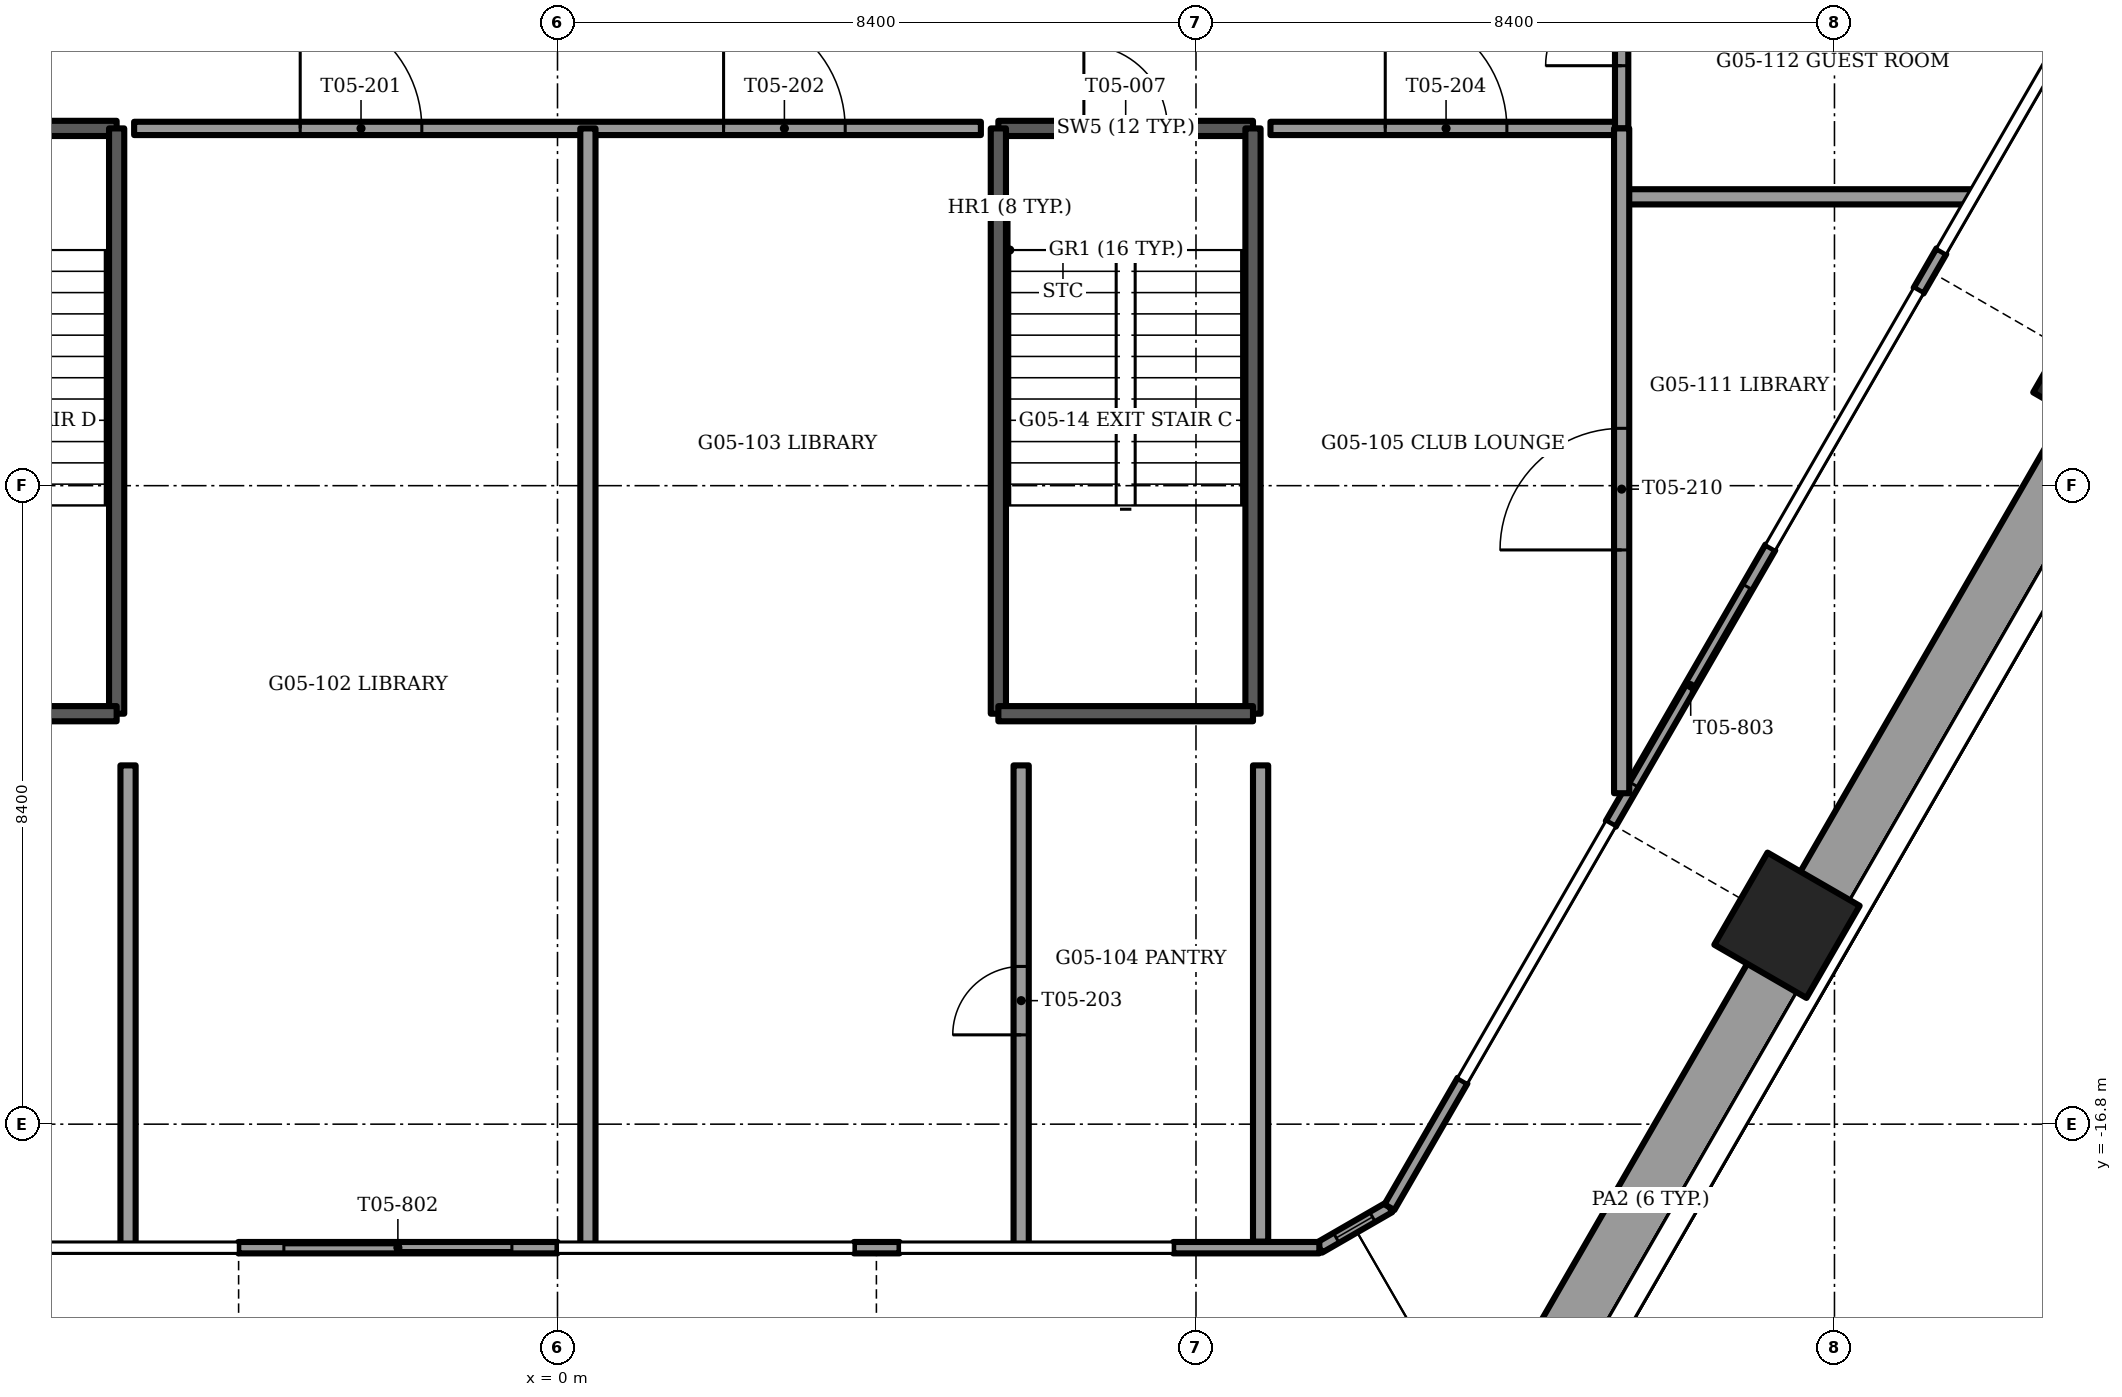
"""IFC4 building model, lengths in metres.
Left out: names, types, materials, properties, quantities, classifications, styles, units other than length and angle.
Written with IfcOpenShell. Run it as: python <this file> out.ifc"""

import sys

from ifc_helpers import new_model, si_unit, direction, frame, frame_2d, origin, origin_2d, place, context, subcontext, project, spatial, rectangle, extrude, element, fill, save


model = new_model("IFC4")
c1 = context("Model", 3, precision=1e-05, world=origin(), true_north=direction((0.0, 1.0)))
c2 = subcontext(c1, "Body", "Model", "MODEL_VIEW")
j1 = project(units=[si_unit("LENGTHUNIT", "METRE"), si_unit("PLANEANGLEUNIT", "RADIAN")], contexts=[c1])
p1 = place(None, origin())
s1 = spatial("IfcSite", under=j1, at=p1, CompositionType="ELEMENT")
p2 = place(p1, origin())
s2 = spatial("IfcBuilding", under=s1, at=p2, CompositionType="ELEMENT")
p3 = place(p2, frame((0.0, 0.0, 23.5)))
s3 = spatial("IfcBuildingStorey", under=s2, at=p3, CompositionType="ELEMENT", Elevation=23.5)
for number, where, z_axis, x_axis in (
    (1, (16.175, -14.183, -1.2), (0.0, 0.0, 1.0), (-0.5, -0.866, 0.0)),
    (2, (20.371, -6.917, -1.2), (0.0, 0.0, 1.0), (-0.5, -0.866, 0.0)),
):
    element("IfcColumn", number, at=place(p3, frame(where, z_axis=z_axis, x_axis=x_axis)), inside=s3, PredefinedType="COLUMN", context=c2, shape_type="SweptSolid", body=[
        extrude(rectangle(XDim=1.4, YDim=1.4, at=origin_2d()), origin(), (0.0, 0.0, 1.0), 4.5),
    ])
p4 = place(p3, frame((12.705, -20.694, 0.0), z_axis=(0.0, 0.0, 1.0), x_axis=(0.500005133765, 0.866022439784, 0.0)))
e3 = element("IfcWall", 3, at=p4, inside=s3, PredefinedType="PARAPET", context=c2, shape_type="SweptSolid", body=[
    extrude(rectangle(XDim=6.704, YDim=0.9, at=frame_2d((3.352, 0.0))), origin(), (0.0, 0.0, 1.0), 1.1),
])
p5 = place(p3, frame((16.727, -13.728, 0.0), z_axis=(0.0, 0.0, 1.0), x_axis=(0.499997206141, 0.866027016814, 0.0)))
e4 = element("IfcWall", 4, at=p5, inside=s3, PredefinedType="PARAPET", context=c2, shape_type="SweptSolid", body=[
    extrude(rectangle(XDim=7.051, YDim=0.9, at=frame_2d((3.525, 0.0))), origin(), (0.0, 0.0, 1.0), 1.1),
])
p6 = place(p3, frame((-4.2, -18.425, 0.0), z_axis=(0.0, 0.0, 1.0), x_axis=(1.0, 0.0, 0.0)))
e5 = element("IfcWall", 5, at=p6, inside=s3, PredefinedType="SOLIDWALL", context=c2, shape_type="SweptSolid", body=[
    extrude(rectangle(XDim=4.2, YDim=0.15, at=frame_2d((2.1, 0.0))), origin(), (0.0, 0.0, 1.0), 4.2),
])
p7 = place(p6, frame((0.6, 0.0, 0.0)))
e6 = element("IfcOpeningElement", 6, at=p7, cuts=e5, PredefinedType="OPENING", context=c2, shape_type="SweptSolid", body=[
    extrude(rectangle(XDim=3.0, YDim=2.4, at=frame_2d((1.5, 1.2))), frame((0.0, 0.075, 0.0), z_axis=(0.0, -1.0, 0.0), x_axis=(1.0, 0.0, 0.0)), (0.0, 0.0, 1.0), 0.15),
])
p8 = place(p3, frame((8.1, -18.425, 0.0), z_axis=(0.0, 0.0, 1.0), x_axis=(1.0, 0.0, 0.0)))
e7 = element("IfcWall", 7, at=p8, inside=s3, PredefinedType="SOLIDWALL", context=c2, shape_type="SweptSolid", body=[
    extrude(rectangle(XDim=1.923, YDim=0.15, at=frame_2d((0.961, 0.0))), origin(), (0.0, 0.0, 1.0), 4.2),
])
p9 = place(p3, frame((3.9, -18.425, 0.0), z_axis=(0.0, 0.0, 1.0), x_axis=(1.0, 0.0, 0.0)))
e8 = element("IfcWall", 8, at=p9, inside=s3, PredefinedType="SOLIDWALL", context=c2, shape_type="SweptSolid", body=[
    extrude(rectangle(XDim=0.6, YDim=0.15, at=frame_2d((0.3, 0.0))), origin(), (0.0, 0.0, 1.0), 4.2),
])
p10 = place(p3, frame((13.856, -12.85, 0.0), z_axis=(0.0, 0.0, 1.0), x_axis=(0.500002543286, 0.866023935413, 0.0)))
e9 = element("IfcWall", 9, at=p10, inside=s3, PredefinedType="SOLIDWALL", context=c2, shape_type="SweptSolid", body=[
    extrude(rectangle(XDim=4.2, YDim=0.15, at=frame_2d((2.1, 0.0))), origin(), (0.0, 0.0, 1.0), 4.2),
])
p11 = place(p10, frame((0.6, 0.0, 0.0)))
e10 = element("IfcOpeningElement", 10, at=p11, cuts=e9, PredefinedType="OPENING", context=c2, shape_type="SweptSolid", body=[
    extrude(rectangle(XDim=3.0, YDim=2.4, at=frame_2d((1.5, 1.2))), frame((0.0, 0.075, 0.0), z_axis=(0.0, -1.0, 0.0), x_axis=(1.0, 0.0, 0.0)), (0.0, 0.0, 1.0), 0.15),
])
p12 = place(p3, frame((10.945, -17.893, 0.0), z_axis=(0.0, 0.0, 1.0), x_axis=(0.499989888488, 0.86603124159, 0.0)))
e11 = element("IfcWall", 11, at=p12, inside=s3, PredefinedType="SOLIDWALL", context=c2, shape_type="SweptSolid", body=[
    extrude(rectangle(XDim=1.923, YDim=0.15, at=frame_2d((0.961, 0.0))), origin(), (0.0, 0.0, 1.0), 4.2),
])
p13 = place(p3, frame((17.906, -5.835, 0.0), z_axis=(0.0, 0.0, 1.0), x_axis=(0.50012165622, 0.865955154139, 0.0)))
e12 = element("IfcWall", 12, at=p13, inside=s3, PredefinedType="SOLIDWALL", context=c2, shape_type="SweptSolid", body=[
    extrude(rectangle(XDim=0.6, YDim=0.15, at=frame_2d((0.3, 0.0))), origin(), (0.0, 0.0, 1.0), 4.2),
])
p14 = place(p3, frame((10.023, -18.425, 0.0), z_axis=(0.0, 0.0, 1.0), x_axis=(0.866048165231, 0.499960573946, 0.0)))
e13 = element("IfcWall", 13, at=p14, inside=s3, PredefinedType="SOLIDWALL", context=c2, shape_type="SweptSolid", body=[
    extrude(rectangle(XDim=1.065, YDim=0.15, at=frame_2d((0.532, 0.0))), origin(), (0.0, 0.0, 1.0), 4.2),
])
p15 = place(p14, frame((0.258, 0.0, 0.15)))
e14 = element("IfcOpeningElement", 14, at=p15, cuts=e13, PredefinedType="OPENING", context=c2, shape_type="SweptSolid", body=[
    extrude(rectangle(XDim=0.55, YDim=3.6, at=frame_2d((0.275, 1.8))), frame((0.0, 0.075, 0.0), z_axis=(0.0, -1.0, 0.0), x_axis=(1.0, 0.0, 0.0)), (0.0, 0.0, 1.0), 0.15),
])
p16 = place(p3, frame((5.8, -3.7, -0.3), z_axis=(0.0, 0.0, 1.0), x_axis=(1.0, 0.0, 0.0)))
e15 = element("IfcWall", 15, at=p16, inside=s3, PredefinedType="SOLIDWALL", context=c2, shape_type="SweptSolid", body=[
    extrude(rectangle(XDim=3.35, YDim=0.2, at=frame_2d((1.675, 0.0))), origin(), (0.0, 0.0, 1.0), 4.5),
])
p17 = place(p16, frame((1.125, 0.0, 0.0)))
e16 = element("IfcOpeningElement", 16, at=p17, cuts=e15, PredefinedType="OPENING", context=c2, shape_type="SweptSolid", body=[
    extrude(rectangle(XDim=1.1, YDim=2.1, at=frame_2d((0.55, 1.05))), frame((0.0, 0.1, 0.0), z_axis=(0.0, -1.0, 0.0), x_axis=(1.0, 0.0, 0.0)), (0.0, 0.0, 1.0), 0.2),
])
for number, where, z_axis, x_axis in (
    (17, (5.8, -3.7, -0.3), (0.0, 0.0, 1.0), (0.0, -1.0, 0.0)),
    (18, (9.15, -3.7, -0.3), (0.0, 0.0, 1.0), (0.0, -1.0, 0.0)),
):
    element("IfcWall", number, at=place(p3, frame(where, z_axis=z_axis, x_axis=x_axis)), inside=s3, PredefinedType="SOLIDWALL", context=c2, shape_type="SweptSolid", body=[
        extrude(rectangle(XDim=7.7, YDim=0.2, at=frame_2d((3.85, 0.0))), origin(), (0.0, 0.0, 1.0), 4.5),
    ])
p18 = place(p3, frame((5.8, -11.4, -0.3), z_axis=(0.0, 0.0, 1.0), x_axis=(1.0, 0.0, 0.0)))
e19 = element("IfcWall", 19, at=p18, inside=s3, PredefinedType="SOLIDWALL", context=c2, shape_type="SweptSolid", body=[
    extrude(rectangle(XDim=3.35, YDim=0.2, at=frame_2d((1.675, 0.0))), origin(), (0.0, 0.0, 1.0), 4.5),
])
p19 = place(p3, frame((-9.15, -3.7, -0.3), z_axis=(0.0, 0.0, 1.0), x_axis=(1.0, 0.0, 0.0)))
e20 = element("IfcWall", 20, at=p19, inside=s3, PredefinedType="SOLIDWALL", context=c2, shape_type="SweptSolid", body=[
    extrude(rectangle(XDim=3.35, YDim=0.2, at=frame_2d((1.675, 0.0))), origin(), (0.0, 0.0, 1.0), 4.5),
])
p20 = place(p19, frame((1.125, 0.0, 0.0)))
e21 = element("IfcOpeningElement", 21, at=p20, cuts=e20, PredefinedType="OPENING", context=c2, shape_type="SweptSolid", body=[
    extrude(rectangle(XDim=1.1, YDim=2.1, at=frame_2d((0.55, 1.05))), frame((0.0, 0.1, 0.0), z_axis=(0.0, -1.0, 0.0), x_axis=(1.0, 0.0, 0.0)), (0.0, 0.0, 1.0), 0.2),
])
p21 = place(p3, frame((-5.8, -3.7, -0.3), z_axis=(0.0, 0.0, 1.0), x_axis=(0.0, -1.0, 0.0)))
e22 = element("IfcWall", 22, at=p21, inside=s3, PredefinedType="SOLIDWALL", context=c2, shape_type="SweptSolid", body=[
    extrude(rectangle(XDim=7.7, YDim=0.2, at=frame_2d((3.85, 0.0))), origin(), (0.0, 0.0, 1.0), 4.5),
])
p22 = place(p3, frame((-9.15, -11.4, -0.3), z_axis=(0.0, 0.0, 1.0), x_axis=(1.0, 0.0, 0.0)))
e23 = element("IfcWall", 23, at=p22, inside=s3, PredefinedType="SOLIDWALL", context=c2, shape_type="SweptSolid", body=[
    extrude(rectangle(XDim=3.35, YDim=0.2, at=frame_2d((1.675, 0.0))), origin(), (0.0, 0.0, 1.0), 4.5),
])
p23 = place(p3, frame((-5.57, -3.7, 0.0), z_axis=(0.0, 0.0, 1.0), x_axis=(1.0, 0.0, 0.0)))
e24 = element("IfcWall", 24, at=p23, inside=s3, PredefinedType="PARTITIONING", context=c2, shape_type="SweptSolid", body=[
    extrude(rectangle(XDim=11.14, YDim=0.175, at=frame_2d((5.57, 0.0))), origin(), (0.0, 0.0, 1.0), 4.2),
])
p24 = place(p23, frame((2.185, 0.0, 0.0)))
e25 = element("IfcOpeningElement", 25, at=p24, cuts=e24, PredefinedType="OPENING", context=c2, shape_type="SweptSolid", body=[
    extrude(rectangle(XDim=1.6, YDim=2.1, at=frame_2d((0.8, 1.05))), frame((0.0, 0.087, 0.0), z_axis=(0.0, -1.0, 0.0), x_axis=(1.0, 0.0, 0.0)), (0.0, 0.0, 1.0), 0.175),
])
p25 = place(p23, frame((7.755, 0.0, 0.0)))
e26 = element("IfcOpeningElement", 26, at=p25, cuts=e24, PredefinedType="OPENING", context=c2, shape_type="SweptSolid", body=[
    extrude(rectangle(XDim=1.6, YDim=2.1, at=frame_2d((0.8, 1.05))), frame((0.0, 0.087, 0.0), z_axis=(0.0, -1.0, 0.0), x_axis=(1.0, 0.0, 0.0)), (0.0, 0.0, 1.0), 0.175),
])
p26 = place(p3, frame((9.38, -3.7, 0.0), z_axis=(0.0, 0.0, 1.0), x_axis=(1.0, 0.0, 0.0)))
e27 = element("IfcWall", 27, at=p26, inside=s3, PredefinedType="PARTITIONING", context=c2, shape_type="SweptSolid", body=[
    extrude(rectangle(XDim=4.62, YDim=0.175, at=frame_2d((2.31, 0.0))), origin(), (0.0, 0.0, 1.0), 4.2),
])
p27 = place(p26, frame((1.51, 0.0, 0.0)))
e28 = element("IfcOpeningElement", 28, at=p27, cuts=e27, PredefinedType="OPENING", context=c2, shape_type="SweptSolid", body=[
    extrude(rectangle(XDim=1.6, YDim=2.1, at=frame_2d((0.8, 1.05))), frame((0.0, 0.087, 0.0), z_axis=(0.0, -1.0, 0.0), x_axis=(1.0, 0.0, 0.0)), (0.0, 0.0, 1.0), 0.175),
])
p28 = place(p3, frame((14.0, -3.7, 0.0), z_axis=(0.0, 0.0, 1.0), x_axis=(0.0, 1.0, 0.0)))
e29 = element("IfcWall", 29, at=p28, inside=s3, PredefinedType="PARTITIONING", context=c2, shape_type="SweptSolid", body=[
    extrude(rectangle(XDim=16.268, YDim=0.175, at=frame_2d((8.134, 0.0))), origin(), (0.0, 0.0, 1.0), 4.2),
])
p29 = place(p28, frame((0.825, 0.0, 0.0)))
e30 = element("IfcOpeningElement", 30, at=p29, cuts=e29, PredefinedType="OPENING", context=c2, shape_type="SweptSolid", body=[
    extrude(rectangle(XDim=1.0, YDim=2.1, at=frame_2d((0.5, 1.05))), frame((0.0, 0.087, 0.0), z_axis=(0.0, -1.0, 0.0), x_axis=(1.0, 0.0, 0.0)), (0.0, 0.0, 1.0), 0.175),
])
p30 = place(p28, frame((6.125, 0.0, 0.0)))
e31 = element("IfcOpeningElement", 31, at=p30, cuts=e29, PredefinedType="OPENING", context=c2, shape_type="SweptSolid", body=[
    extrude(rectangle(XDim=1.0, YDim=2.1, at=frame_2d((0.5, 1.05))), frame((0.0, 0.087, 0.0), z_axis=(0.0, -1.0, 0.0), x_axis=(1.0, 0.0, 0.0)), (0.0, 0.0, 1.0), 0.175),
])
p31 = place(p28, frame((12.55, 0.0, 0.0)))
e32 = element("IfcOpeningElement", 32, at=p31, cuts=e29, PredefinedType="OPENING", context=c2, shape_type="SweptSolid", body=[
    extrude(rectangle(XDim=0.9, YDim=2.1, at=frame_2d((0.45, 1.05))), frame((0.0, 0.087, 0.0), z_axis=(0.0, -1.0, 0.0), x_axis=(1.0, 0.0, 0.0)), (0.0, 0.0, 1.0), 0.175),
])
p32 = place(p3, frame((14.0, -4.6, 0.0), z_axis=(0.0, 0.0, 1.0), x_axis=(1.0, 0.0, 0.0)))
e33 = element("IfcWall", 33, at=p32, inside=s3, PredefinedType="PARTITIONING", context=c2, shape_type="SweptSolid", body=[
    extrude(rectangle(XDim=4.598, YDim=0.2, at=frame_2d((2.299, 0.0))), origin(), (0.0, 0.0, 1.0), 4.2),
])
p33 = place(p3, frame((-5.65, -18.406, 0.0), z_axis=(0.0, 0.0, 1.0), x_axis=(0.0, 1.0, 0.0)))
e34 = element("IfcWall", 34, at=p33, inside=s3, PredefinedType="PARTITIONING", context=c2, shape_type="SweptSolid", body=[
    extrude(rectangle(XDim=6.326, YDim=0.2, at=frame_2d((3.163, 0.0))), origin(), (0.0, 0.0, 1.0), 4.2),
])
p34 = place(p3, frame((0.4, -18.406, 0.0), z_axis=(0.0, 0.0, 1.0), x_axis=(0.0, 1.0, 0.0)))
e35 = element("IfcWall", 35, at=p34, inside=s3, PredefinedType="PARTITIONING", context=c2, shape_type="SweptSolid", body=[
    extrude(rectangle(XDim=14.706, YDim=0.2, at=frame_2d((7.353, 0.0))), origin(), (0.0, 0.0, 1.0), 4.2),
])
p35 = place(p3, frame((6.1, -18.406, 0.0), z_axis=(0.0, 0.0, 1.0), x_axis=(0.0, 1.0, 0.0)))
e36 = element("IfcWall", 36, at=p35, inside=s3, PredefinedType="PARTITIONING", context=c2, shape_type="SweptSolid", body=[
    extrude(rectangle(XDim=6.326, YDim=0.2, at=frame_2d((3.163, 0.0))), origin(), (0.0, 0.0, 1.0), 4.2),
])
p36 = place(p35, frame((2.781, 0.0, 0.0)))
e37 = element("IfcOpeningElement", 37, at=p36, cuts=e36, PredefinedType="OPENING", context=c2, shape_type="SweptSolid", body=[
    extrude(rectangle(XDim=0.9, YDim=2.1, at=frame_2d((0.45, 1.05))), frame((0.0, 0.1, 0.0), z_axis=(0.0, -1.0, 0.0), x_axis=(1.0, 0.0, 0.0)), (0.0, 0.0, 1.0), 0.2),
])
p37 = place(p3, frame((9.25, -18.345, 0.0), z_axis=(0.0, 0.0, 1.0), x_axis=(0.0, 1.0, 0.0)))
e38 = element("IfcWall", 38, at=p37, inside=s3, PredefinedType="PARTITIONING", context=c2, shape_type="SweptSolid", body=[
    extrude(rectangle(XDim=6.265, YDim=0.2, at=frame_2d((3.132, 0.0))), origin(), (0.0, 0.0, 1.0), 4.2),
])
p38 = place(p3, frame((14.0, -12.446, 0.0), z_axis=(0.0, 0.0, 1.0), x_axis=(0.0, 1.0, 0.0)))
e39 = element("IfcWall", 39, at=p38, inside=s3, PredefinedType="PARTITIONING", context=c2, shape_type="SweptSolid", body=[
    extrude(rectangle(XDim=8.746, YDim=0.2, at=frame_2d((4.373, 0.0))), origin(), (0.0, 0.0, 1.0), 4.2),
])
p39 = place(p38, frame((3.201, 0.0, 0.0)))
e40 = element("IfcOpeningElement", 40, at=p39, cuts=e39, PredefinedType="OPENING", context=c2, shape_type="SweptSolid", body=[
    extrude(rectangle(XDim=1.6, YDim=2.1, at=frame_2d((0.8, 1.05))), frame((0.0, 0.1, 0.0), z_axis=(0.0, -1.0, 0.0), x_axis=(1.0, 0.0, 0.0)), (0.0, 0.0, 1.0), 0.2),
])
p40 = place(p7, origin())
e41 = element("IfcDoor", 41, at=p40, inside=s3, OperationType="SLIDING_TO_RIGHT", PredefinedType="DOOR", context=c2, shape_type="SweptSolid", body=[
    extrude(rectangle(XDim=3.0, YDim=2.4, at=frame_2d((1.5, 1.2))), frame((0.0, 0.025, 0.0), z_axis=(0.0, -1.0, 0.0), x_axis=(1.0, 0.0, 0.0)), (0.0, 0.0, 1.0), 0.05),
])
fill(e6, e41)
p41 = place(p11, origin())
e42 = element("IfcDoor", 42, at=p41, inside=s3, OperationType="SLIDING_TO_RIGHT", PredefinedType="DOOR", context=c2, shape_type="SweptSolid", body=[
    extrude(rectangle(XDim=3.0, YDim=2.4, at=frame_2d((1.5, 1.2))), frame((0.0, 0.025, 0.0), z_axis=(0.0, -1.0, 0.0), x_axis=(1.0, 0.0, 0.0)), (0.0, 0.0, 1.0), 0.05),
])
fill(e10, e42)
p42 = place(p15, origin())
e43 = element("IfcWindow", 43, at=p42, inside=s3, PartitioningType="SINGLE_PANEL", PredefinedType="WINDOW", context=c2, shape_type="SweptSolid", body=[
    extrude(rectangle(XDim=0.55, YDim=3.6, at=frame_2d((0.275, 1.8))), frame((0.0, 0.03, 0.0), z_axis=(0.0, -1.0, 0.0), x_axis=(1.0, 0.0, 0.0)), (0.0, 0.0, 1.0), 0.06),
])
fill(e14, e43)
p43 = place(p17, origin())
e44 = element("IfcDoor", 44, at=p43, inside=s3, OperationType="SINGLE_SWING_LEFT", PredefinedType="DOOR", context=c2, shape_type="SweptSolid", body=[
    extrude(rectangle(XDim=1.1, YDim=2.1, at=frame_2d((0.55, 1.05))), frame((0.0, 0.025, 0.0), z_axis=(0.0, -1.0, 0.0), x_axis=(1.0, 0.0, 0.0)), (0.0, 0.0, 1.0), 0.05),
])
fill(e16, e44)
p44 = place(p24, origin())
e45 = element("IfcDoor", 45, at=p44, inside=s3, OperationType="DOUBLE_DOOR_SINGLE_SWING", PredefinedType="DOOR", context=c2, shape_type="SweptSolid", body=[
    extrude(rectangle(XDim=1.6, YDim=2.1, at=frame_2d((0.8, 1.05))), frame((0.0, 0.025, 0.0), z_axis=(0.0, -1.0, 0.0), x_axis=(1.0, 0.0, 0.0)), (0.0, 0.0, 1.0), 0.05),
])
fill(e25, e45)
p45 = place(p25, origin())
e46 = element("IfcDoor", 46, at=p45, inside=s3, OperationType="DOUBLE_DOOR_SINGLE_SWING", PredefinedType="DOOR", context=c2, shape_type="SweptSolid", body=[
    extrude(rectangle(XDim=1.6, YDim=2.1, at=frame_2d((0.8, 1.05))), frame((0.0, 0.025, 0.0), z_axis=(0.0, -1.0, 0.0), x_axis=(1.0, 0.0, 0.0)), (0.0, 0.0, 1.0), 0.05),
])
fill(e26, e46)
p46 = place(p36, origin())
e47 = element("IfcDoor", 47, at=p46, inside=s3, OperationType="SINGLE_SWING_LEFT", PredefinedType="DOOR", context=c2, shape_type="SweptSolid", body=[
    extrude(rectangle(XDim=0.9, YDim=2.1, at=frame_2d((0.45, 1.05))), frame((0.0, 0.025, 0.0), z_axis=(0.0, -1.0, 0.0), x_axis=(1.0, 0.0, 0.0)), (0.0, 0.0, 1.0), 0.05),
])
fill(e37, e47)
p47 = place(p27, origin())
e48 = element("IfcDoor", 48, at=p47, inside=s3, OperationType="DOUBLE_DOOR_SINGLE_SWING", PredefinedType="DOOR", context=c2, shape_type="SweptSolid", body=[
    extrude(rectangle(XDim=1.6, YDim=2.1, at=frame_2d((0.8, 1.05))), frame((0.0, 0.025, 0.0), z_axis=(0.0, -1.0, 0.0), x_axis=(1.0, 0.0, 0.0)), (0.0, 0.0, 1.0), 0.05),
])
fill(e28, e48)
p48 = place(p39, origin())
e49 = element("IfcDoor", 49, at=p48, inside=s3, OperationType="DOUBLE_DOOR_SINGLE_SWING", PredefinedType="DOOR", context=c2, shape_type="SweptSolid", body=[
    extrude(rectangle(XDim=1.6, YDim=2.1, at=frame_2d((0.8, 1.05))), frame((0.0, 0.025, 0.0), z_axis=(0.0, -1.0, 0.0), x_axis=(1.0, 0.0, 0.0)), (0.0, 0.0, 1.0), 0.05),
])
fill(e40, e49)
p49 = place(p29, origin())
e50 = element("IfcDoor", 50, at=p49, inside=s3, OperationType="SINGLE_SWING_LEFT", PredefinedType="DOOR", context=c2, shape_type="SweptSolid", body=[
    extrude(rectangle(XDim=1.0, YDim=2.1, at=frame_2d((0.5, 1.05))), frame((0.0, 0.025, 0.0), z_axis=(0.0, -1.0, 0.0), x_axis=(1.0, 0.0, 0.0)), (0.0, 0.0, 1.0), 0.05),
])
fill(e30, e50)
save(model, sys.argv[1])
